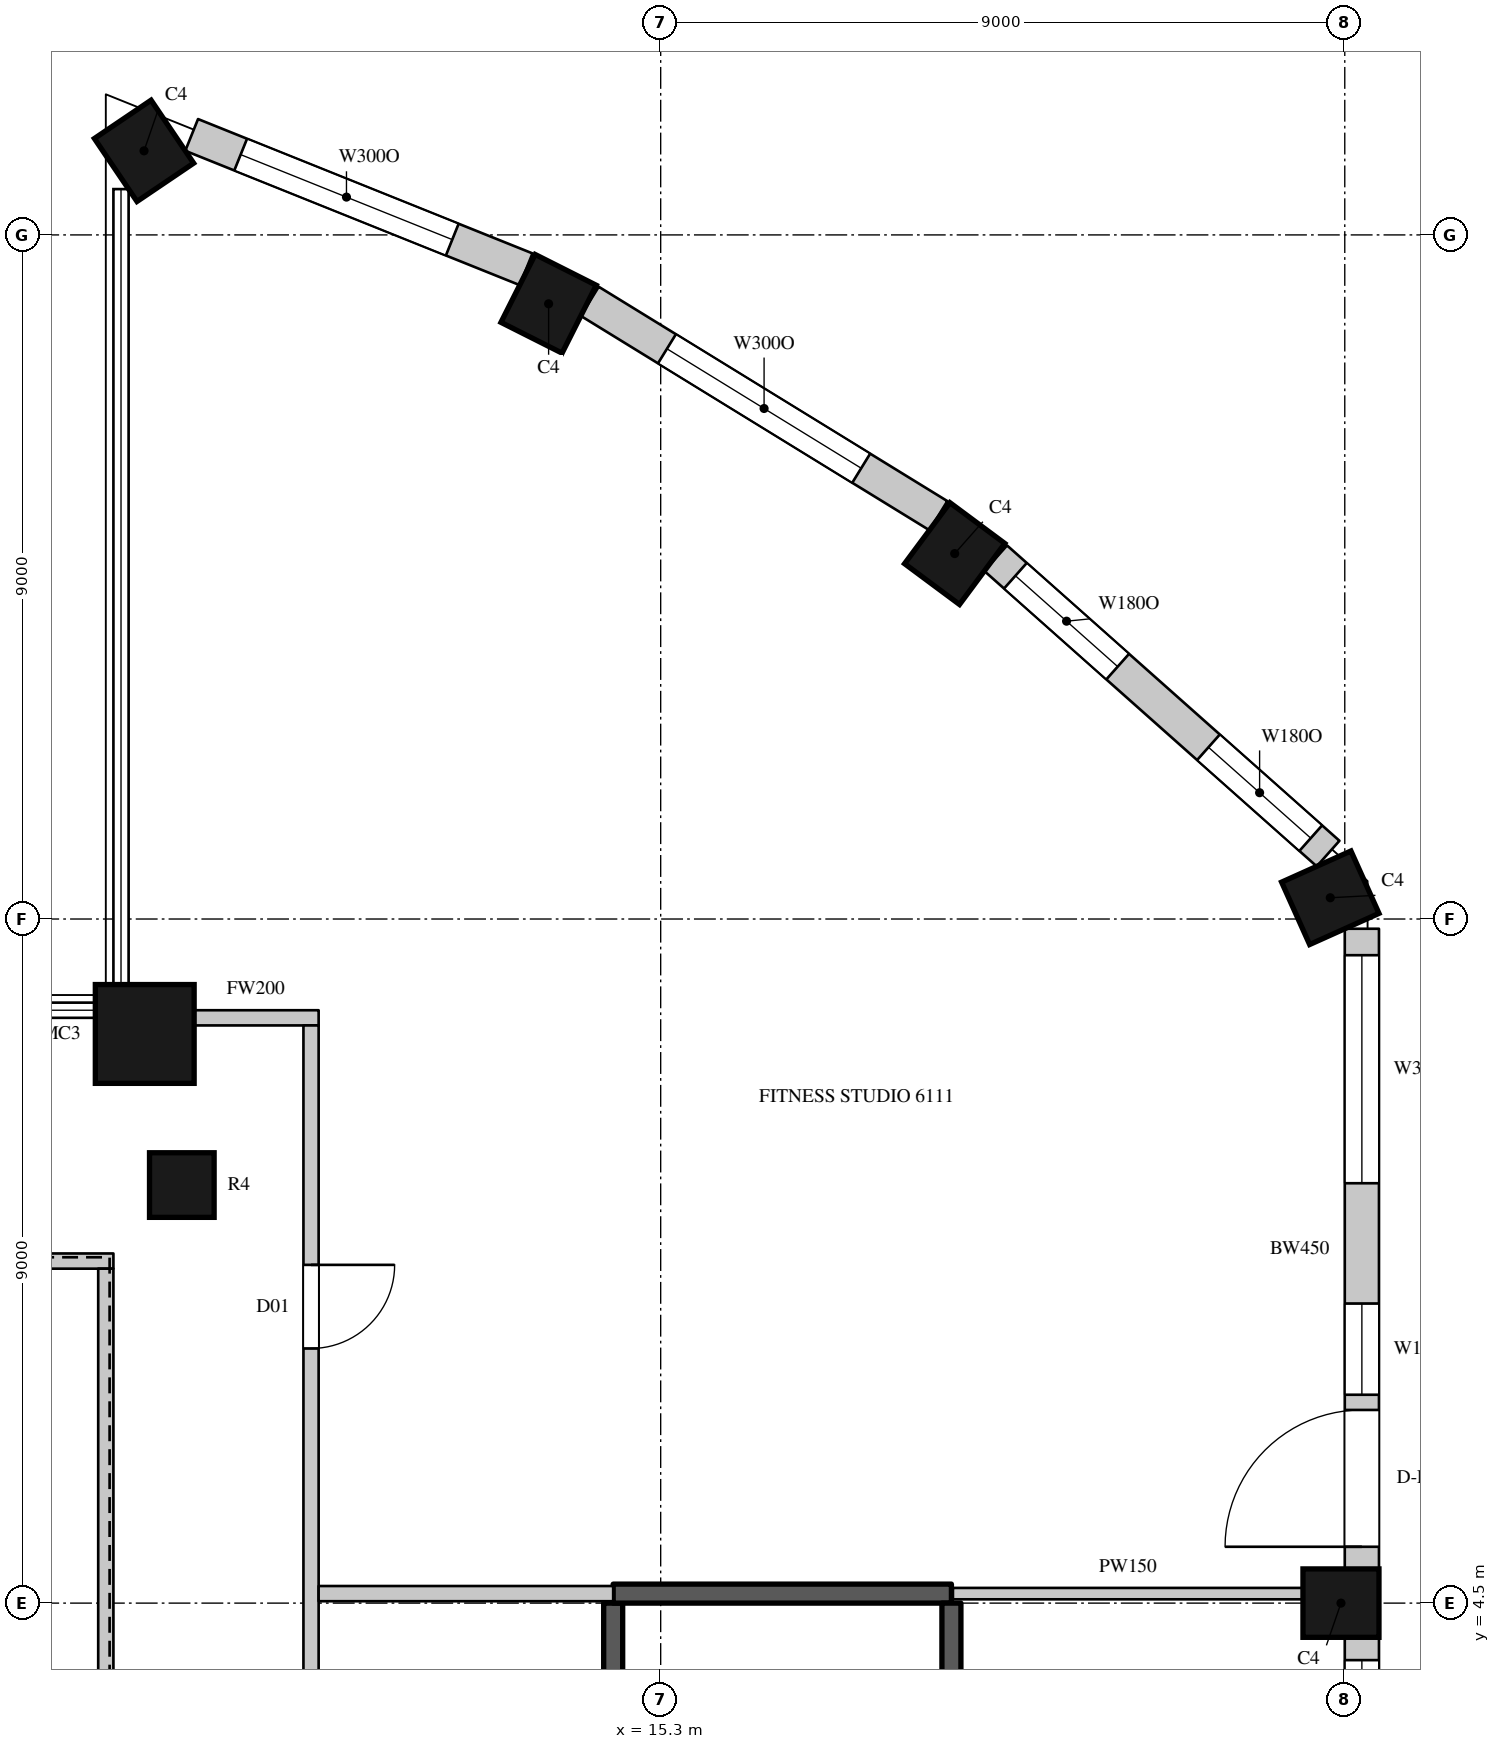
"""IFC4 building model, lengths in metres.
Left out: names, types, materials, properties, quantities, classifications, styles, units other than length and angle.
Written with IfcOpenShell. Run it as: python <this file> out.ifc"""

import sys

from ifc_helpers import new_model, si_unit, direction, frame, frame_2d, origin, origin_2d, place, context, subcontext, project, spatial, rectangle, circle, extrude, element, fill, save


model = new_model("IFC4")
c1 = context("Model", 3, precision=1e-05, world=origin(), true_north=direction((0.0, 1.0)))
c2 = subcontext(c1, "Body", "Model", "MODEL_VIEW")
j1 = project(units=[si_unit("LENGTHUNIT", "METRE"), si_unit("PLANEANGLEUNIT", "RADIAN")], contexts=[c1])
p1 = place(None, origin())
s1 = spatial("IfcSite", under=j1, at=p1, CompositionType="ELEMENT")
p2 = place(p1, origin())
s2 = spatial("IfcBuilding", under=s1, at=p2, CompositionType="ELEMENT")
p3 = place(p2, frame((0.0, 0.0, 272.1)))
s3 = spatial("IfcBuildingStorey", under=s2, at=p3, CompositionType="ELEMENT", Elevation=272.1)
p4 = place(p3, frame((8.503, 23.606, 0.0), z_axis=(0.0, 0.0, 1.0), x_axis=(-0.828469606019, -0.560034027451, 0.0)))
e1 = element("IfcColumn", 1, at=p4, inside=s3, PredefinedType="COLUMN", context=c2, shape_type="SweptSolid", body=[
    extrude(rectangle(XDim=0.9, YDim=1.0, at=origin_2d()), origin(), (0.0, 0.0, 1.0), 4.1),
])
p5 = place(p3, frame((8.512, 11.988, 0.0), z_axis=(0.0, 0.0, 1.0), x_axis=(1.0, 0.0, 0.0)))
e2 = element("IfcColumn", 2, at=p5, inside=s3, PredefinedType="COLUMN", context=c2, shape_type="SweptSolid", body=[
    extrude(circle(Radius=0.65, at=origin_2d()), origin(), (0.0, 0.0, 1.0), 4.1),
])
for number, where, z_axis, x_axis in (
    (3, (24.25, 4.5, 0.0), (0.0, 0.0, 1.0), (0.0, 1.0, 0.0)),
    (4, (24.11, 13.78, 0.0), (0.0, 0.0, 1.0), (-0.41, 0.912, 0.0)),
    (5, (19.168, 18.308, 0.0), (0.0, 0.0, 1.0), (-0.803, 0.596, 0.0)),
    (6, (13.826, 21.594, 0.0), (0.0, 0.0, 1.0), (-0.893, 0.45, 0.0)),
):
    element("IfcColumn", number, at=place(p3, frame(where, z_axis=z_axis, x_axis=x_axis)), inside=s3, PredefinedType="COLUMN", context=c2, shape_type="SweptSolid", body=[
        extrude(rectangle(XDim=0.9, YDim=1.0, at=origin_2d()), origin(), (0.0, 0.0, 1.0), 4.1),
    ])
p6 = place(p3, frame((9.0, 10.0, 0.0), z_axis=(0.0, 0.0, 1.0), x_axis=(1.0, 0.0, 0.0)))
e7 = element("IfcColumn", 7, at=p6, inside=s3, PredefinedType="COLUMN", context=c2, shape_type="SweptSolid", body=[
    extrude(circle(Radius=0.425, at=origin_2d()), origin(), (0.0, 0.0, 1.0), 4.1),
])
p7 = place(p3, frame((24.525, -4.05, 0.0), z_axis=(0.0, 0.0, 1.0), x_axis=(0.0, 1.0, 0.0)))
e8 = element("IfcWall", 8, at=p7, inside=s3, PredefinedType="SOLIDWALL", context=c2, shape_type="SweptSolid", body=[
    extrude(rectangle(XDim=8.1, YDim=0.45, at=frame_2d((4.05, 0.0))), origin(), (0.0, 0.0, 1.0), 3.8),
])
p8 = place(p7, frame((0.3, 0.0, 1.05)))
e9 = element("IfcOpeningElement", 9, at=p8, cuts=e8, PredefinedType="OPENING", context=c2, shape_type="SweptSolid", body=[
    extrude(rectangle(XDim=3.0, YDim=2.4, at=frame_2d((1.5, 1.2))), frame((0.0, 0.235, 0.0), z_axis=(0.0, -1.0, 0.0), x_axis=(1.0, 0.0, 0.0)), (0.0, 0.0, 1.0), 0.47),
])
p9 = place(p7, frame((4.8, 0.0, 1.05)))
e10 = element("IfcOpeningElement", 10, at=p9, cuts=e8, PredefinedType="OPENING", context=c2, shape_type="SweptSolid", body=[
    extrude(rectangle(XDim=3.0, YDim=2.4, at=frame_2d((1.5, 1.2))), frame((0.0, 0.235, 0.0), z_axis=(0.0, -1.0, 0.0), x_axis=(1.0, 0.0, 0.0)), (0.0, 0.0, 1.0), 0.47),
])
p10 = place(p3, frame((24.525, 4.95, 0.0), z_axis=(0.0, 0.0, 1.0), x_axis=(0.0, 1.0, 0.0)))
e11 = element("IfcWall", 11, at=p10, inside=s3, PredefinedType="SOLIDWALL", context=c2, shape_type="SweptSolid", body=[
    extrude(rectangle(XDim=8.422, YDim=0.45, at=frame_2d((4.211, 0.0))), origin(), (0.0, 0.0, 1.0), 3.8),
])
p11 = place(p10, frame((0.291, 0.0, 0.0)))
e12 = element("IfcOpeningElement", 12, at=p11, cuts=e11, PredefinedType="OPENING", context=c2, shape_type="SweptSolid", body=[
    extrude(rectangle(XDim=1.8, YDim=2.4, at=frame_2d((0.9, 1.2))), frame((0.0, 0.235, 0.0), z_axis=(0.0, -1.0, 0.0), x_axis=(1.0, 0.0, 0.0)), (0.0, 0.0, 1.0), 0.47),
])
p12 = place(p10, frame((2.291, 0.0, 1.05)))
e13 = element("IfcOpeningElement", 13, at=p12, cuts=e11, PredefinedType="OPENING", context=c2, shape_type="SweptSolid", body=[
    extrude(rectangle(XDim=1.2, YDim=2.4, at=frame_2d((0.6, 1.2))), frame((0.0, 0.235, 0.0), z_axis=(0.0, -1.0, 0.0), x_axis=(1.0, 0.0, 0.0)), (0.0, 0.0, 1.0), 0.47),
])
p13 = place(p10, frame((5.074, 0.0, 1.05)))
e14 = element("IfcOpeningElement", 14, at=p13, cuts=e11, PredefinedType="OPENING", context=c2, shape_type="SweptSolid", body=[
    extrude(rectangle(XDim=3.0, YDim=2.4, at=frame_2d((1.5, 1.2))), frame((0.0, 0.235, 0.0), z_axis=(0.0, -1.0, 0.0), x_axis=(1.0, 0.0, 0.0)), (0.0, 0.0, 1.0), 0.47),
])
p14 = place(p3, frame((24.081, 14.361, 0.0), z_axis=(0.0, 0.0, 1.0), x_axis=(-0.747570482973, 0.664182484704, 0.0)))
e15 = element("IfcWall", 15, at=p14, inside=s3, PredefinedType="SOLIDWALL", context=c2, shape_type="SweptSolid", body=[
    extrude(rectangle(XDim=5.85, YDim=0.45, at=frame_2d((2.925, 0.0))), origin(), (0.0, 0.0, 1.0), 3.8),
])
p15 = place(p14, frame((0.305, 0.0, 1.05)))
e16 = element("IfcOpeningElement", 16, at=p15, cuts=e15, PredefinedType="OPENING", context=c2, shape_type="SweptSolid", body=[
    extrude(rectangle(XDim=1.8, YDim=2.4, at=frame_2d((0.9, 1.2))), frame((0.0, 0.235, 0.0), z_axis=(0.0, -1.0, 0.0), x_axis=(1.0, 0.0, 0.0)), (0.0, 0.0, 1.0), 0.47),
])
p16 = place(p14, frame((3.703, 0.0, 1.05)))
e17 = element("IfcOpeningElement", 17, at=p16, cuts=e15, PredefinedType="OPENING", context=c2, shape_type="SweptSolid", body=[
    extrude(rectangle(XDim=1.8, YDim=2.4, at=frame_2d((0.9, 1.2))), frame((0.0, 0.235, 0.0), z_axis=(0.0, -1.0, 0.0), x_axis=(1.0, 0.0, 0.0)), (0.0, 0.0, 1.0), 0.47),
])
p17 = place(p3, frame((18.953, 18.806, 0.0), z_axis=(0.0, 0.0, 1.0), x_axis=(-0.851860664503, 0.523768468193, 0.0)))
e18 = element("IfcWall", 18, at=p17, inside=s3, PredefinedType="SOLIDWALL", context=c2, shape_type="SweptSolid", body=[
    extrude(rectangle(XDim=5.384, YDim=0.45, at=frame_2d((2.692, 0.0))), origin(), (0.0, 0.0, 1.0), 3.8),
])
p18 = place(p17, frame((1.192, 0.0, 1.05)))
e19 = element("IfcOpeningElement", 19, at=p18, cuts=e18, PredefinedType="OPENING", context=c2, shape_type="SweptSolid", body=[
    extrude(rectangle(XDim=3.0, YDim=2.4, at=frame_2d((1.5, 1.2))), frame((0.0, 0.235, 0.0), z_axis=(0.0, -1.0, 0.0), x_axis=(1.0, 0.0, 0.0)), (0.0, 0.0, 1.0), 0.47),
])
p19 = place(p3, frame((13.529, 22.048, 0.0), z_axis=(0.0, 0.0, 1.0), x_axis=(-0.927957332619, 0.372686448424, 0.0)))
e20 = element("IfcWall", 20, at=p19, inside=s3, PredefinedType="SOLIDWALL", context=c2, shape_type="SweptSolid", body=[
    extrude(rectangle(XDim=4.741, YDim=0.45, at=frame_2d((2.371, 0.0))), origin(), (0.0, 0.0, 1.0), 3.8),
])
p20 = place(p19, frame((1.047, 0.0, 1.05)))
e21 = element("IfcOpeningElement", 21, at=p20, cuts=e20, PredefinedType="OPENING", context=c2, shape_type="SweptSolid", body=[
    extrude(rectangle(XDim=3.0, YDim=2.4, at=frame_2d((1.5, 1.2))), frame((0.0, 0.235, 0.0), z_axis=(0.0, -1.0, 0.0), x_axis=(1.0, 0.0, 0.0)), (0.0, 0.0, 1.0), 0.47),
])
p21 = place(p3, frame((-6.1, 9.0, 0.0), z_axis=(0.0, 0.0, 1.0), x_axis=(1.0, 0.0, 0.0)))
e22 = element("IfcWall", 22, at=p21, inside=s3, PredefinedType="PARTITIONING", context=c2, shape_type="SweptSolid", body=[
    extrude(rectangle(XDim=14.2, YDim=0.2, at=frame_2d((7.1, 0.0))), origin(), (0.0, 0.0, 1.0), 3.8),
])
p22 = place(p3, frame((8.0, -4.48, 0.0), z_axis=(0.0, 0.0, 1.0), x_axis=(0.0, 1.0, 0.0)))
e23 = element("IfcWall", 23, at=p22, inside=s3, PredefinedType="PARTITIONING", context=c2, shape_type="SweptSolid", body=[
    extrude(rectangle(XDim=13.38, YDim=0.2, at=frame_2d((6.69, 0.0))), origin(), (0.0, 0.0, 1.0), 3.8),
])
p23 = place(p3, frame((9.144, 12.2, 0.0), z_axis=(0.0, 0.0, 1.0), x_axis=(1.0, 0.0, 0.0)))
e24 = element("IfcWall", 24, at=p23, inside=s3, PredefinedType="PARTITIONING", context=c2, shape_type="SweptSolid", body=[
    extrude(rectangle(XDim=1.656, YDim=0.2, at=frame_2d((0.828, 0.0))), origin(), (0.0, 0.0, 1.0), 3.8),
])
p24 = place(p3, frame((10.7, -11.7, 0.0), z_axis=(0.0, 0.0, 1.0), x_axis=(0.0, 1.0, 0.0)))
e25 = element("IfcWall", 25, at=p24, inside=s3, PredefinedType="PARTITIONING", context=c2, shape_type="SweptSolid", body=[
    extrude(rectangle(XDim=23.8, YDim=0.2, at=frame_2d((11.9, 0.0))), origin(), (0.0, 0.0, 1.0), 3.8),
])
p25 = place(p24, frame((12.35, 0.0, 0.0)))
e26 = element("IfcOpeningElement", 26, at=p25, cuts=e25, PredefinedType="OPENING", context=c2, shape_type="SweptSolid", body=[
    extrude(rectangle(XDim=1.5, YDim=2.4, at=frame_2d((0.75, 1.2))), frame((0.0, 0.11, 0.0), z_axis=(0.0, -1.0, 0.0), x_axis=(1.0, 0.0, 0.0)), (0.0, 0.0, 1.0), 0.22),
])
p26 = place(p24, frame((19.55, 0.0, 0.0)))
e27 = element("IfcOpeningElement", 27, at=p26, cuts=e25, PredefinedType="OPENING", context=c2, shape_type="SweptSolid", body=[
    extrude(rectangle(XDim=1.1, YDim=2.4, at=frame_2d((0.55, 1.2))), frame((0.0, 0.11, 0.0), z_axis=(0.0, -1.0, 0.0), x_axis=(1.0, 0.0, 0.0)), (0.0, 0.0, 1.0), 0.22),
])
p27 = place(p24, frame((4.25, 0.0, 0.0)))
e28 = element("IfcOpeningElement", 28, at=p27, cuts=e25, PredefinedType="OPENING", context=c2, shape_type="SweptSolid", body=[
    extrude(rectangle(XDim=1.1, YDim=2.4, at=frame_2d((0.55, 1.2))), frame((0.0, 0.11, 0.0), z_axis=(0.0, -1.0, 0.0), x_axis=(1.0, 0.0, 0.0)), (0.0, 0.0, 1.0), 0.22),
])
p28 = place(p3, frame((10.8, 4.625, 0.0), z_axis=(0.0, 0.0, 1.0), x_axis=(1.0, 0.0, 0.0)))
e29 = element("IfcWall", 29, at=p28, inside=s3, PredefinedType="PARTITIONING", context=c2, shape_type="SweptSolid", body=[
    extrude(rectangle(XDim=3.875, YDim=0.2, at=frame_2d((1.938, 0.0))), origin(), (0.0, 0.0, 1.0), 3.8),
])
p29 = place(p3, frame((19.145, 4.625, 0.0), z_axis=(0.0, 0.0, 1.0), x_axis=(1.0, 0.0, 0.0)))
e30 = element("IfcWall", 30, at=p29, inside=s3, PredefinedType="PARTITIONING", context=c2, shape_type="SweptSolid", body=[
    extrude(rectangle(XDim=4.605, YDim=0.15, at=frame_2d((2.302, 0.0))), origin(), (0.0, 0.0, 1.0), 3.8),
])
p30 = place(p3, frame((14.675, -4.5, 0.0), z_axis=(0.0, 0.0, 1.0), x_axis=(0.0, 1.0, 0.0)))
e31 = element("IfcWall", 31, at=p30, inside=s3, PredefinedType="SHEAR", context=c2, shape_type="SweptSolid", body=[
    extrude(rectangle(XDim=9.0, YDim=0.25, at=frame_2d((4.5, 0.0))), origin(), (0.0, 0.0, 1.0), 3.8),
])
p31 = place(p30, frame((0.45, 0.0, 0.0)))
e32 = element("IfcOpeningElement", 32, at=p31, cuts=e31, PredefinedType="OPENING", context=c2, shape_type="SweptSolid", body=[
    extrude(rectangle(XDim=1.1, YDim=2.2, at=frame_2d((0.55, 1.1))), frame((0.0, 0.135, 0.0), z_axis=(0.0, -1.0, 0.0), x_axis=(1.0, 0.0, 0.0)), (0.0, 0.0, 1.0), 0.27),
])
p32 = place(p3, frame((14.675, 4.625, 0.0), z_axis=(0.0, 0.0, 1.0), x_axis=(1.0, 0.0, 0.0)))
e33 = element("IfcWall", 33, at=p32, inside=s3, PredefinedType="SHEAR", context=c2, shape_type="SweptSolid", body=[
    extrude(rectangle(XDim=4.45, YDim=0.25, at=frame_2d((2.225, 0.0))), origin(), (0.0, 0.0, 1.0), 3.8),
])
p33 = place(p3, frame((19.125, -4.5, 0.0), z_axis=(0.0, 0.0, 1.0), x_axis=(0.0, 1.0, 0.0)))
e34 = element("IfcWall", 34, at=p33, inside=s3, PredefinedType="SHEAR", context=c2, shape_type="SweptSolid", body=[
    extrude(rectangle(XDim=9.0, YDim=0.25, at=frame_2d((4.5, 0.0))), origin(), (0.0, 0.0, 1.0), 3.8),
])
p34 = place(p9, origin())
e35 = element("IfcWindow", 35, at=p34, inside=s3, PartitioningType="SINGLE_PANEL", PredefinedType="WINDOW", context=c2, shape_type="SweptSolid", body=[
    extrude(rectangle(XDim=3.0, YDim=2.4, at=frame_2d((1.5, 1.2))), frame((0.0, 0.135, 0.0), z_axis=(0.0, -1.0, 0.0), x_axis=(1.0, 0.0, 0.0)), (0.0, 0.0, 1.0), 0.06),
])
fill(e10, e35)
p35 = place(p11, origin())
e36 = element("IfcDoor", 36, at=p35, inside=s3, OperationType="SLIDING_TO_LEFT", PredefinedType="DOOR", context=c2, shape_type="SweptSolid", body=[
    extrude(rectangle(XDim=1.8, YDim=2.4, at=frame_2d((0.9, 1.2))), frame((0.0, 0.13, 0.0), z_axis=(0.0, -1.0, 0.0), x_axis=(1.0, 0.0, 0.0)), (0.0, 0.0, 1.0), 0.05),
])
fill(e12, e36)
p36 = place(p12, origin())
e37 = element("IfcWindow", 37, at=p36, inside=s3, PartitioningType="SINGLE_PANEL", PredefinedType="WINDOW", context=c2, shape_type="SweptSolid", body=[
    extrude(rectangle(XDim=1.2, YDim=2.4, at=frame_2d((0.6, 1.2))), frame((0.0, 0.135, 0.0), z_axis=(0.0, -1.0, 0.0), x_axis=(1.0, 0.0, 0.0)), (0.0, 0.0, 1.0), 0.06),
])
fill(e13, e37)
p37 = place(p13, origin())
e38 = element("IfcWindow", 38, at=p37, inside=s3, PartitioningType="SINGLE_PANEL", PredefinedType="WINDOW", context=c2, shape_type="SweptSolid", body=[
    extrude(rectangle(XDim=3.0, YDim=2.4, at=frame_2d((1.5, 1.2))), frame((0.0, 0.135, 0.0), z_axis=(0.0, -1.0, 0.0), x_axis=(1.0, 0.0, 0.0)), (0.0, 0.0, 1.0), 0.06),
])
fill(e14, e38)
p38 = place(p15, origin())
e39 = element("IfcWindow", 39, at=p38, inside=s3, PartitioningType="SINGLE_PANEL", PredefinedType="WINDOW", context=c2, shape_type="SweptSolid", body=[
    extrude(rectangle(XDim=1.8, YDim=2.4, at=frame_2d((0.9, 1.2))), frame((0.0, 0.135, 0.0), z_axis=(0.0, -1.0, 0.0), x_axis=(1.0, 0.0, 0.0)), (0.0, 0.0, 1.0), 0.06),
])
fill(e16, e39)
p39 = place(p16, origin())
e40 = element("IfcWindow", 40, at=p39, inside=s3, PartitioningType="SINGLE_PANEL", PredefinedType="WINDOW", context=c2, shape_type="SweptSolid", body=[
    extrude(rectangle(XDim=1.8, YDim=2.4, at=frame_2d((0.9, 1.2))), frame((0.0, 0.135, 0.0), z_axis=(0.0, -1.0, 0.0), x_axis=(1.0, 0.0, 0.0)), (0.0, 0.0, 1.0), 0.06),
])
fill(e17, e40)
p40 = place(p18, origin())
e41 = element("IfcWindow", 41, at=p40, inside=s3, PartitioningType="SINGLE_PANEL", PredefinedType="WINDOW", context=c2, shape_type="SweptSolid", body=[
    extrude(rectangle(XDim=3.0, YDim=2.4, at=frame_2d((1.5, 1.2))), frame((0.0, 0.135, 0.0), z_axis=(0.0, -1.0, 0.0), x_axis=(1.0, 0.0, 0.0)), (0.0, 0.0, 1.0), 0.06),
])
fill(e19, e41)
p41 = place(p20, origin())
e42 = element("IfcWindow", 42, at=p41, inside=s3, PartitioningType="SINGLE_PANEL", PredefinedType="WINDOW", context=c2, shape_type="SweptSolid", body=[
    extrude(rectangle(XDim=3.0, YDim=2.4, at=frame_2d((1.5, 1.2))), frame((0.0, 0.135, 0.0), z_axis=(0.0, -1.0, 0.0), x_axis=(1.0, 0.0, 0.0)), (0.0, 0.0, 1.0), 0.06),
])
fill(e21, e42)
p42 = place(p26, origin())
e43 = element("IfcDoor", 43, at=p42, inside=s3, OperationType="SINGLE_SWING_LEFT", PredefinedType="DOOR", context=c2, shape_type="SweptSolid", body=[
    extrude(rectangle(XDim=1.1, YDim=2.4, at=frame_2d((0.55, 1.2))), frame((0.0, 0.025, 0.0), z_axis=(0.0, -1.0, 0.0), x_axis=(1.0, 0.0, 0.0)), (0.0, 0.0, 1.0), 0.05),
])
fill(e27, e43)
save(model, sys.argv[1])
